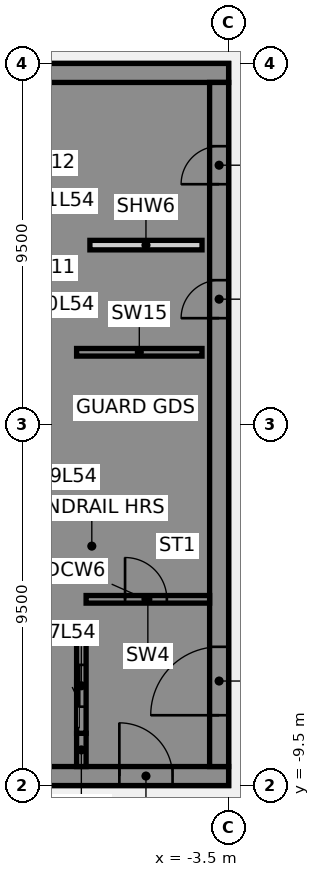
"""IFC4 building model, lengths in metres.
Left out: names, types, materials, properties, quantities, classifications, styles, units other than length and angle.
Written with IfcOpenShell. Run it as: python <this file> out.ifc"""

import sys

from ifc_helpers import new_model, si_unit, direction, frame, frame_2d, origin, place, context, subcontext, project, spatial, polyline, rectangle, outline, extrude, element, fill, save


model = new_model("IFC4")
c1 = context("Model", 3, precision=1e-05, world=origin(), true_north=direction((0.0, 1.0)))
c2 = subcontext(c1, "Body", "Model", "MODEL_VIEW")
j1 = project(units=[si_unit("LENGTHUNIT", "METRE"), si_unit("PLANEANGLEUNIT", "RADIAN")], contexts=[c1])
p1 = place(None, origin())
s1 = spatial("IfcSite", under=j1, at=p1, CompositionType="ELEMENT")
p2 = place(p1, origin())
s2 = spatial("IfcBuilding", under=s1, at=p2, CompositionType="ELEMENT")
p3 = place(p2, frame((0.0, 0.0, 214.9)))
s3 = spatial("IfcBuildingStorey", under=s2, at=p3, CompositionType="ELEMENT", Elevation=214.9)
p4 = place(p3, frame((-16.5, -9.25, 0.0), z_axis=(0.0, 0.0, 1.0), x_axis=(1.0, 0.0, 0.0)))
e1 = element("IfcWall", 1, at=p4, inside=s3, PredefinedType="SHEAR", context=c2, shape_type="SweptSolid", body=[
    extrude(rectangle(XDim=13.0, YDim=0.5, at=frame_2d((6.5, 0.0))), origin(), (0.0, 0.0, 1.0), 4.86),
])
p5 = place(p4, frame((4.15, 0.0, 0.0)))
e2 = element("IfcOpeningElement", 2, at=p5, cuts=e1, PredefinedType="OPENING", context=c2, shape_type="SweptSolid", body=[
    extrude(rectangle(XDim=1.4, YDim=2.1, at=frame_2d((0.7, 1.05))), frame((0.0, 0.26, 0.0), z_axis=(0.0, -1.0, 0.0), x_axis=(1.0, 0.0, 0.0)), (0.0, 0.0, 1.0), 0.52),
])
p6 = place(p4, frame((10.125, 0.0, 0.0)))
e3 = element("IfcOpeningElement", 3, at=p6, cuts=e1, PredefinedType="OPENING", context=c2, shape_type="SweptSolid", body=[
    extrude(rectangle(XDim=1.4, YDim=2.1, at=frame_2d((0.7, 1.05))), frame((0.0, 0.26, 0.0), z_axis=(0.0, -1.0, 0.0), x_axis=(1.0, 0.0, 0.0)), (0.0, 0.0, 1.0), 0.52),
])
p7 = place(p3, frame((-16.5, 9.25, 0.0), z_axis=(0.0, 0.0, 1.0), x_axis=(1.0, 0.0, 0.0)))
e4 = element("IfcWall", 4, at=p7, inside=s3, PredefinedType="SHEAR", context=c2, shape_type="SweptSolid", body=[
    extrude(rectangle(XDim=13.0, YDim=0.5, at=frame_2d((6.5, 0.0))), origin(), (0.0, 0.0, 1.0), 4.86),
])
p8 = place(p7, frame((4.15, 0.0, 0.0)))
e5 = element("IfcOpeningElement", 5, at=p8, cuts=e4, PredefinedType="OPENING", context=c2, shape_type="SweptSolid", body=[
    extrude(rectangle(XDim=1.4, YDim=2.1, at=frame_2d((0.7, 1.05))), frame((0.0, 0.26, 0.0), z_axis=(0.0, -1.0, 0.0), x_axis=(1.0, 0.0, 0.0)), (0.0, 0.0, 1.0), 0.52),
])
p9 = place(p3, origin())
e6 = element("IfcWall", 6, at=p9, inside=s3, PredefinedType="SHEAR", context=c2, shape_type="SweptSolid", body=[
    extrude(outline(polyline([(-9.8, -5.375), (-9.8, -5.625), (-7.5, -5.625), (-7.25, -5.625), (-7.25, 9.0), (-7.5, 9.0), (-9.8, 9.0), (-9.8, 8.125), (-7.5, 8.125), (-7.5, 5.625), (-9.8, 5.625), (-9.8, 5.375), (-7.5, 5.375), (-7.5, 2.875), (-9.8, 2.875), (-9.8, 2.625), (-7.5, 2.625), (-7.5, 0.125), (-9.8, 0.125), (-9.8, -0.125), (-7.5, -0.125), (-7.5, -2.625), (-9.8, -2.625), (-9.8, -2.875), (-7.5, -2.875), (-7.5, -5.375), (-9.8, -5.375)])), origin(), (0.0, 0.0, 1.0), 4.86),
])
p10 = place(p3, origin())
e7 = element("IfcWall", 7, at=p10, inside=s3, PredefinedType="SHEAR", context=c2, shape_type="SweptSolid", body=[
    extrude(outline(polyline([(-7.5, -8.125), (-9.55, -8.125), (-9.55, -5.625), (-9.8, -5.625), (-9.8, -8.125), (-9.8, -9.0), (-7.5, -9.0), (-7.5, -8.125)])), origin(), (0.0, 0.0, 1.0), 4.86),
])
p11 = place(p3, frame((-7.375, -9.0, 0.0), z_axis=(0.0, 0.0, 1.0), x_axis=(0.0, 1.0, 0.0)))
e8 = element("IfcWall", 8, at=p11, inside=s3, PredefinedType="SHEAR", context=c2, shape_type="SweptSolid", body=[
    extrude(rectangle(XDim=0.875, YDim=0.25, at=frame_2d((0.438, 0.0))), origin(), (0.0, 0.0, 1.0), 4.86),
])
p12 = place(p3, frame((-7.5, 1.9, 0.0), z_axis=(0.0, 0.0, 1.0), x_axis=(1.0, 0.0, 0.0)))
e9 = element("IfcWall", 9, at=p12, inside=s3, PredefinedType="SHEAR", context=c2, shape_type="SweptSolid", body=[
    extrude(rectangle(XDim=3.3, YDim=0.2, at=frame_2d((1.65, 0.0))), origin(), (0.0, 0.0, 1.0), 4.86),
])
p13 = place(p3, frame((-7.375, -8.125, 0.0), z_axis=(0.0, 0.0, 1.0), x_axis=(0.0, 1.0, 0.0)))
e10 = element("IfcWall", 10, at=p13, inside=s3, PredefinedType="SHEAR", context=c2, shape_type="SweptSolid", body=[
    extrude(rectangle(XDim=2.5, YDim=0.25, at=frame_2d((1.25, 0.0))), origin(), (0.0, 0.0, 1.0), 4.86),
])
p14 = place(p13, frame((0.7, 0.0, 0.0)))
e11 = element("IfcOpeningElement", 11, at=p14, cuts=e10, PredefinedType="OPENING", context=c2, shape_type="SweptSolid", body=[
    extrude(rectangle(XDim=1.1, YDim=2.1, at=frame_2d((0.55, 1.05))), frame((0.0, 0.135, 0.0), z_axis=(0.0, -1.0, 0.0), x_axis=(1.0, 0.0, 0.0)), (0.0, 0.0, 1.0), 0.27),
])
p15 = place(p3, frame((-3.75, -9.0, 0.0), z_axis=(0.0, 0.0, 1.0), x_axis=(0.0, 1.0, 0.0)))
e12 = element("IfcWall", 12, at=p15, inside=s3, PredefinedType="SHEAR", context=c2, shape_type="SweptSolid", body=[
    extrude(rectangle(XDim=18.0, YDim=0.5, at=frame_2d((9.0, 0.0))), origin(), (0.0, 0.0, 1.0), 4.86),
])
p16 = place(p15, frame((1.35, 0.0, 0.0)))
e13 = element("IfcOpeningElement", 13, at=p16, cuts=e12, PredefinedType="OPENING", context=c2, shape_type="SweptSolid", body=[
    extrude(rectangle(XDim=1.8, YDim=2.1, at=frame_2d((0.9, 1.05))), frame((0.0, 0.26, 0.0), z_axis=(0.0, -1.0, 0.0), x_axis=(1.0, 0.0, 0.0)), (0.0, 0.0, 1.0), 0.52),
])
p17 = place(p15, frame((11.798, 0.0, 0.0)))
e14 = element("IfcOpeningElement", 14, at=p17, cuts=e12, PredefinedType="OPENING", context=c2, shape_type="SweptSolid", body=[
    extrude(rectangle(XDim=1.0, YDim=2.1, at=frame_2d((0.5, 1.05))), frame((0.0, 0.26, 0.0), z_axis=(0.0, -1.0, 0.0), x_axis=(1.0, 0.0, 0.0)), (0.0, 0.0, 1.0), 0.52),
])
p18 = place(p15, frame((15.323, 0.0, 0.0)))
e15 = element("IfcOpeningElement", 15, at=p18, cuts=e12, PredefinedType="OPENING", context=c2, shape_type="SweptSolid", body=[
    extrude(rectangle(XDim=1.0, YDim=2.1, at=frame_2d((0.5, 1.05))), frame((0.0, 0.26, 0.0), z_axis=(0.0, -1.0, 0.0), x_axis=(1.0, 0.0, 0.0)), (0.0, 0.0, 1.0), 0.52),
])
p19 = place(p3, frame((-7.15, 4.72, 0.0), z_axis=(0.0, 0.0, 1.0), x_axis=(1.0, 0.0, 0.0)))
e16 = element("IfcWall", 16, at=p19, inside=s3, PredefinedType="PARTITIONING", context=c2, shape_type="SweptSolid", body=[
    extrude(rectangle(XDim=2.95, YDim=0.25, at=frame_2d((1.475, 0.0))), origin(), (0.0, 0.0, 1.0), 4.86),
])
p20 = place(p3, frame((-7.25, -4.6, 0.0), z_axis=(0.0, 0.0, 1.0), x_axis=(1.0, 0.0, 0.0)))
e17 = element("IfcWall", 17, at=p20, inside=s3, PredefinedType="SHEAR", context=c2, shape_type="SweptSolid", body=[
    extrude(rectangle(XDim=3.25, YDim=0.2, at=frame_2d((1.625, 0.0))), origin(), (0.0, 0.0, 1.0), 4.86),
])
p21 = place(p20, frame((1.025, 0.0, 0.0)))
e18 = element("IfcOpeningElement", 18, at=p21, cuts=e17, PredefinedType="OPENING", context=c2, shape_type="SweptSolid", body=[
    extrude(rectangle(XDim=1.1, YDim=2.1, at=frame_2d((0.55, 1.05))), frame((0.0, 0.11, 0.0), z_axis=(0.0, -1.0, 0.0), x_axis=(1.0, 0.0, 0.0)), (0.0, 0.0, 1.0), 0.22),
])
p22 = place(p6, origin())
e19 = element("IfcDoor", 19, at=p22, inside=s3, OperationType="SINGLE_SWING_LEFT", PredefinedType="DOOR", context=c2, shape_type="SweptSolid", body=[
    extrude(rectangle(XDim=1.4, YDim=2.1, at=frame_2d((0.7, 1.05))), frame((0.0, 0.025, 0.0), z_axis=(0.0, -1.0, 0.0), x_axis=(1.0, 0.0, 0.0)), (0.0, 0.0, 1.0), 0.05),
])
fill(e3, e19)
p23 = place(p16, origin())
e20 = element("IfcDoor", 20, at=p23, inside=s3, OperationType="SINGLE_SWING_LEFT", PredefinedType="DOOR", context=c2, shape_type="SweptSolid", body=[
    extrude(rectangle(XDim=1.8, YDim=2.1, at=frame_2d((0.9, 1.05))), frame((0.0, 0.025, 0.0), z_axis=(0.0, -1.0, 0.0), x_axis=(1.0, 0.0, 0.0)), (0.0, 0.0, 1.0), 0.05),
])
fill(e13, e20)
p24 = place(p17, origin())
e21 = element("IfcDoor", 21, at=p24, inside=s3, OperationType="SINGLE_SWING_LEFT", PredefinedType="DOOR", context=c2, shape_type="SweptSolid", body=[
    extrude(rectangle(XDim=1.0, YDim=2.1, at=frame_2d((0.5, 1.05))), frame((0.0, 0.225, 0.0), z_axis=(0.0, -1.0, 0.0), x_axis=(1.0, 0.0, 0.0)), (0.0, 0.0, 1.0), 0.05),
])
fill(e14, e21)
p25 = place(p18, origin())
e22 = element("IfcDoor", 22, at=p25, inside=s3, OperationType="SINGLE_SWING_LEFT", PredefinedType="DOOR", context=c2, shape_type="SweptSolid", body=[
    extrude(rectangle(XDim=1.0, YDim=2.1, at=frame_2d((0.5, 1.05))), frame((0.0, 0.225, 0.0), z_axis=(0.0, -1.0, 0.0), x_axis=(1.0, 0.0, 0.0)), (0.0, 0.0, 1.0), 0.05),
])
fill(e15, e22)
p26 = place(p21, origin())
e23 = element("IfcDoor", 23, at=p26, inside=s3, OperationType="SINGLE_SWING_LEFT", PredefinedType="DOOR", context=c2, shape_type="SweptSolid", body=[
    extrude(rectangle(XDim=1.1, YDim=2.1, at=frame_2d((0.55, 1.05))), frame((0.0, 0.025, 0.0), z_axis=(0.0, -1.0, 0.0), x_axis=(1.0, 0.0, 0.0)), (0.0, 0.0, 1.0), 0.05),
])
fill(e18, e23)
p27 = place(p14, origin())
e24 = element("IfcDoor", 24, at=p27, inside=s3, OperationType="SLIDING_TO_LEFT", PredefinedType="DOOR", context=c2, shape_type="SweptSolid", body=[
    extrude(rectangle(XDim=1.1, YDim=2.1, at=frame_2d((0.55, 1.05))), frame((0.0, 0.025, 0.0), z_axis=(0.0, -1.0, 0.0), x_axis=(1.0, 0.0, 0.0)), (0.0, 0.0, 1.0), 0.05),
])
fill(e11, e24)
save(model, sys.argv[1])
